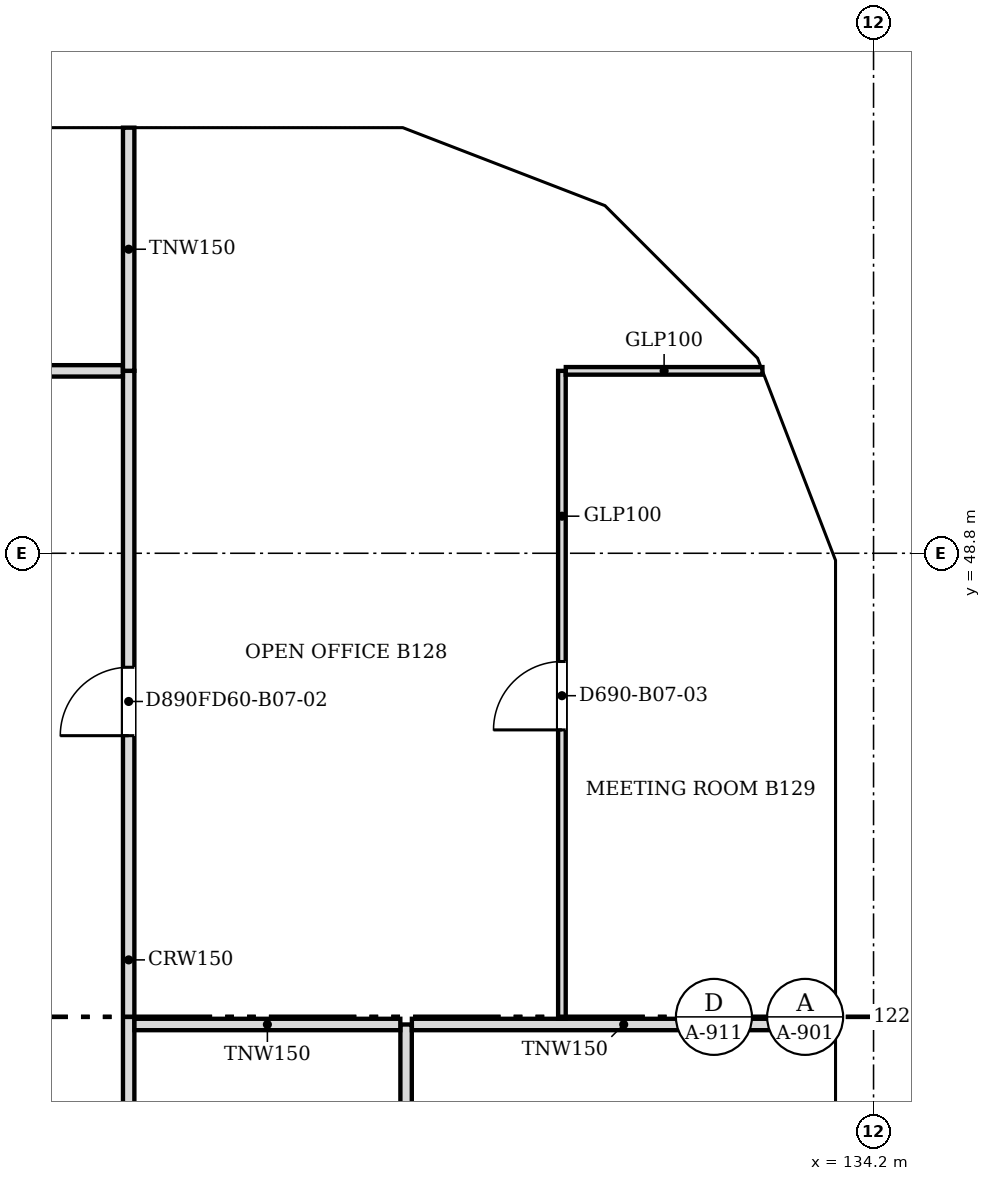
"""IFC4 building model, lengths in metres.
Left out: names, types, materials, properties, quantities, classifications, styles, units other than length and angle.
Written with IfcOpenShell. Run it as: python <this file> out.ifc"""

import sys

from ifc_helpers import new_model, si_unit, direction, frame, frame_2d, origin, place, context, subcontext, project, spatial, polyline, rectangle, outline, extrude, faceted_brep, source, transform, mapped, element, fill, save


model = new_model("IFC4")
c1 = context("Model", 3, precision=1e-05, world=origin(), true_north=direction((0.0, 1.0)))
c2 = subcontext(c1, "Body", "Model", "MODEL_VIEW")
j1 = project(units=[si_unit("LENGTHUNIT", "METRE"), si_unit("PLANEANGLEUNIT", "RADIAN")], contexts=[c1])
p1 = place(None, origin())
s1 = spatial("IfcSite", under=j1, at=p1, CompositionType="ELEMENT")
p2 = place(p1, origin())
s2 = spatial("IfcBuilding", under=s1, at=p2, CompositionType="ELEMENT")
p3 = place(p2, frame((0.0, 0.0, 68.6)))
s3 = spatial("IfcBuildingStorey", under=s2, at=p3, CompositionType="ELEMENT", Elevation=68.6)
m1 = source(origin(), c2, "Body", "Brep", [
    faceted_brep([(6.1, -0.25, 0.0), (3.05, -0.25, 3.8), (0.0, -0.25, 0.0), (6.1, -0.25, 0.0), (0.0, 0.25, 0.0), (3.05, 0.25, 3.8), (6.1, 0.25, 0.0), (6.1, 0.25, 0.0)], [[[0, 1, 2, 3]], [[4, 5, 6, 7]], [[6, 5, 1, 0]], [[5, 4, 2, 1]], [[4, 7, 3, 2]], [[3, 7, 6, 0]]]),
])
p4 = place(p3, frame((133.95, 36.6, 0.0), z_axis=(0.0, 0.0, 1.0), x_axis=(0.0, 1.0, 0.0)))
e1 = element("IfcWall", 1, at=p4, inside=s3, PredefinedType="SOLIDWALL", context=c2, shape_type="MappedRepresentation", body=[
    mapped(m1, transform((0.0, 0.0, 0.0), scale=1.0)),
])
m2 = source(origin(), c2, "Body", "SweptSolid", [
    extrude(outline(polyline([(5.579, 0.25), (3.05, 3.4), (0.521, 0.25), (5.579, 0.25)])), frame((0.0, 0.26, 0.0), z_axis=(0.0, -1.0, 0.0), x_axis=(1.0, 0.0, 0.0)), (0.0, 0.0, 1.0), 0.52),
])
p5 = place(p4, origin())
e2 = element("IfcOpeningElement", 2, at=p5, cuts=e1, PredefinedType="OPENING", context=c2, shape_type="MappedRepresentation", body=[
    mapped(m2, transform((0.0, 0.0, 0.0), scale=1.0)),
])
m3 = source(origin(), c2, "Body", "Brep", [
    faceted_brep([(6.053, -0.25, 0.0), (3.05, -0.25, 3.8), (0.0, -0.25, 0.0), (0.0, 0.25, 0.0), (3.05, 0.25, 3.8), (6.007, 0.25, 0.059), (6.007, 0.25, 0.0), (6.053, 0.0, 0.0)], [[[0, 1, 2]], [[3, 4, 5, 6]], [[5, 4, 1, 0, 7]], [[4, 3, 2, 1]], [[3, 6, 7, 0, 2]], [[7, 6, 5]]]),
])
p6 = place(p3, frame((133.95, 42.7, 0.0), z_axis=(0.0, 0.0, 1.0), x_axis=(0.0, 1.0, 0.0)))
e3 = element("IfcWall", 3, at=p6, inside=s3, PredefinedType="SOLIDWALL", context=c2, shape_type="MappedRepresentation", body=[
    mapped(m3, transform((0.0, 0.0, 0.0), scale=1.0)),
])
m4 = source(origin(), c2, "Body", "SweptSolid", [
    extrude(outline(polyline([(5.537, 0.25), (3.049, 3.399), (0.521, 0.25), (5.537, 0.25)])), frame((0.0, 0.26, 0.0), z_axis=(0.0, -1.0, 0.0), x_axis=(1.0, 0.0, 0.0)), (0.0, 0.0, 1.0), 0.52),
])
p7 = place(p6, origin())
e4 = element("IfcOpeningElement", 4, at=p7, cuts=e3, PredefinedType="OPENING", context=c2, shape_type="MappedRepresentation", body=[
    mapped(m4, transform((0.0, 0.0, 0.0), scale=1.0)),
])
m5 = source(origin(), c2, "Body", "Brep", [
    faceted_brep([(3.003, -0.25, 3.731), (2.95, -0.25, 3.8), (0.0, -0.25, 0.0), (3.003, -0.25, 0.0), (0.047, 0.25, 0.06), (2.898, 0.25, 3.732), (2.898, 0.25, 0.0), (0.047, 0.25, 0.0), (2.95, 0.0, 3.8), (0.0, 0.0, 0.0)], [[[0, 1, 2, 3]], [[4, 5, 6, 7]], [[8, 1, 0]], [[5, 4, 9, 2, 1, 8]], [[7, 6, 3, 2, 9]], [[7, 9, 4]], [[3, 6, 5, 8, 0]]]),
])
p8 = place(p3, frame((133.95, 48.753, 0.0), z_axis=(0.0, 0.0, 1.0), x_axis=(-0.359855894603, 0.933007896601, 0.0)))
e5 = element("IfcWall", 5, at=p8, inside=s3, PredefinedType="SOLIDWALL", context=c2, shape_type="MappedRepresentation", body=[
    mapped(m5, transform((0.0, 0.0, 0.0), scale=1.0)),
])
m6 = source(origin(), c2, "Body", "SweptSolid", [
    extrude(outline(polyline([(2.75, 3.135), (0.511, 0.25), (2.75, 0.25), (2.75, 3.135)])), frame((0.0, 0.26, 0.0), z_axis=(0.0, -1.0, 0.0), x_axis=(1.0, 0.0, 0.0)), (0.0, 0.0, 1.0), 0.52),
])
p9 = place(p8, origin())
e6 = element("IfcOpeningElement", 6, at=p9, cuts=e5, PredefinedType="OPENING", context=c2, shape_type="MappedRepresentation", body=[
    mapped(m6, transform((0.0, 0.0, 0.0), scale=1.0)),
])
m7 = source(origin(), c2, "Body", "Brep", [
    faceted_brep([(2.997, -0.25, 0.0), (0.053, -0.25, 3.8), (0.0, -0.25, 3.732), (0.0, -0.25, 0.0), (0.106, 0.25, 3.731), (2.944, 0.25, 0.068), (2.944, 0.25, 0.0), (0.106, 0.25, 0.0), (0.053, 0.0, 3.8), (2.997, 0.0, 0.0)], [[[0, 1, 2, 3]], [[4, 5, 6, 7]], [[5, 4, 8, 1, 0, 9]], [[2, 1, 8]], [[7, 6, 9, 0, 3]], [[7, 3, 2, 8, 4]], [[9, 6, 5]]]),
])
p10 = place(p3, frame((132.926, 51.469, 0.0), z_axis=(0.0, 0.0, 1.0), x_axis=(-0.707066050402, 0.707147509625, 0.0)))
e7 = element("IfcWall", 7, at=p10, inside=s3, PredefinedType="SOLIDWALL", context=c2, shape_type="MappedRepresentation", body=[
    mapped(m7, transform((0.0, 0.0, 0.0), scale=1.0)),
])
m8 = source(origin(), c2, "Body", "SweptSolid", [
    extrude(outline(polyline([(2.487, 0.25), (0.253, 3.134), (0.253, 0.25), (2.487, 0.25)])), frame((0.0, 0.26, 0.0), z_axis=(0.0, -1.0, 0.0), x_axis=(1.0, 0.0, 0.0)), (0.0, 0.0, 1.0), 0.52),
])
p11 = place(p10, origin())
e8 = element("IfcOpeningElement", 8, at=p11, cuts=e7, PredefinedType="OPENING", context=c2, shape_type="MappedRepresentation", body=[
    mapped(m8, transform((0.0, 0.0, 0.0), scale=1.0)),
])
m9 = source(origin(), c2, "Body", "Brep", [
    faceted_brep([(2.997, -0.25, 3.741), (2.95, -0.25, 3.8), (0.0, -0.25, 0.0), (2.997, -0.25, 0.0), (0.053, 0.25, 0.068), (2.904, 0.25, 3.74), (2.904, 0.25, 0.0), (0.053, 0.25, 0.0), (2.95, 0.0, 3.8), (0.0, 0.0, 0.0)], [[[0, 1, 2, 3]], [[4, 5, 6, 7]], [[8, 1, 0]], [[5, 4, 9, 2, 1, 8]], [[7, 6, 3, 2, 9]], [[7, 9, 4]], [[3, 6, 5, 8, 0]]]),
])
p12 = place(p3, frame((130.806, 53.588, 0.0), z_axis=(0.0, 0.0, 1.0), x_axis=(-0.932990326376, 0.359901446078, 0.0)))
e9 = element("IfcWall", 9, at=p12, inside=s3, PredefinedType="SOLIDWALL", context=c2, shape_type="MappedRepresentation", body=[
    mapped(m9, transform((0.0, 0.0, 0.0), scale=1.0)),
])
p13 = place(p12, origin())
e10 = element("IfcOpeningElement", 10, at=p13, cuts=e9, PredefinedType="OPENING", context=c2, shape_type="MappedRepresentation", body=[
    mapped(m6, transform((0.0, 0.0, 0.0), scale=1.0)),
])
m10 = source(origin(), c2, "Body", "Brep", [
    faceted_brep([(3.05, -0.25, 0.0), (0.047, -0.25, 3.8), (0.0, -0.25, 3.74), (0.0, -0.25, 0.0), (0.093, 0.25, 3.741), (3.05, 0.25, 0.0), (0.093, 0.25, 0.0), (0.047, 0.0, 3.8)], [[[0, 1, 2, 3]], [[4, 5, 6]], [[5, 4, 7, 1, 0]], [[2, 1, 7]], [[6, 5, 0, 3]], [[6, 3, 2, 7, 4]]]),
])
p14 = place(p3, frame((128.1, 54.65, 0.0), z_axis=(0.0, 0.0, 1.0), x_axis=(-1.0, 0.0, 0.0)))
e11 = element("IfcWall", 11, at=p14, inside=s3, PredefinedType="SOLIDWALL", context=c2, shape_type="MappedRepresentation", body=[
    mapped(m10, transform((0.0, 0.0, 0.0), scale=1.0)),
])
m11 = source(origin(), c2, "Body", "SweptSolid", [
    extrude(outline(polyline([(2.534, 0.25), (0.247, 3.144), (0.247, 0.25), (2.534, 0.25)])), frame((0.0, 0.26, 0.0), z_axis=(0.0, -1.0, 0.0), x_axis=(1.0, 0.0, 0.0)), (0.0, 0.0, 1.0), 0.52),
])
p15 = place(p14, origin())
e12 = element("IfcOpeningElement", 12, at=p15, cuts=e11, PredefinedType="OPENING", context=c2, shape_type="MappedRepresentation", body=[
    mapped(m11, transform((0.0, 0.0, 0.0), scale=1.0)),
])
m12 = source(origin(), c2, "Body", "SweptSolid", [
    extrude(outline(polyline([(6.1, 0.0), (3.05, 3.8), (0.0, 0.0), (6.1, 0.0)])), frame((0.0, 0.25, 0.0), z_axis=(0.0, -1.0, 0.0), x_axis=(1.0, 0.0, 0.0)), (0.0, 0.0, 1.0), 0.5),
])
p16 = place(p3, frame((125.05, 54.65, 0.0), z_axis=(0.0, 0.0, 1.0), x_axis=(-1.0, 0.0, 0.0)))
e13 = element("IfcWall", 13, at=p16, inside=s3, PredefinedType="SOLIDWALL", context=c2, shape_type="MappedRepresentation", body=[
    mapped(m12, transform((0.0, 0.0, 0.0), scale=1.0)),
])
p17 = place(p16, origin())
e14 = element("IfcOpeningElement", 14, at=p17, cuts=e13, PredefinedType="OPENING", context=c2, shape_type="MappedRepresentation", body=[
    mapped(m2, transform((0.0, 0.0, 0.0), scale=1.0)),
])
p18 = place(p2, frame((0.0, 0.0, 72.4)))
s4 = spatial("IfcBuildingStorey", under=s2, at=p18, CompositionType="ELEMENT", Elevation=72.4)
m13 = source(origin(), c2, "Body", "SweptSolid", [
    extrude(outline(polyline([(3.05, 0.0), (6.1, 3.8), (3.05, 7.6), (0.0, 3.8), (3.05, 0.0)])), frame((0.0, 0.25, 0.0), z_axis=(0.0, -1.0, 0.0), x_axis=(1.0, 0.0, 0.0)), (0.0, 0.0, 1.0), 0.5),
])
p19 = place(p18, frame((133.95, 39.65, -3.8), z_axis=(0.0, 0.0, 1.0), x_axis=(0.0, 1.0, 0.0)))
e15 = element("IfcWall", 15, at=p19, inside=s4, PredefinedType="SOLIDWALL", context=c2, shape_type="MappedRepresentation", body=[
    mapped(m13, transform((0.0, 0.0, 0.0), scale=1.0)),
])
m14 = source(origin(), c2, "Body", "SweptSolid", [
    extrude(outline(polyline([(3.05, 0.399), (5.78, 3.8), (3.05, 7.2), (0.321, 3.8), (3.05, 0.399)])), frame((0.0, 0.26, 0.0), z_axis=(0.0, -1.0, 0.0), x_axis=(1.0, 0.0, 0.0)), (0.0, 0.0, 1.0), 0.52),
])
p20 = place(p19, origin())
e16 = element("IfcOpeningElement", 16, at=p20, cuts=e15, PredefinedType="OPENING", context=c2, shape_type="MappedRepresentation", body=[
    mapped(m14, transform((0.0, 0.0, 0.0), scale=1.0)),
])
m15 = source(origin(), c2, "Body", "Brep", [
    faceted_brep([(3.003, -0.25, 0.0), (3.05, -0.25, 0.06), (3.05, -0.25, 7.54), (3.003, -0.25, 7.6), (0.0, -0.25, 3.8), (0.0, 0.25, 3.8), (2.957, 0.25, 7.541), (2.957, 0.25, 0.059), (3.003, 0.0, 0.0), (3.003, 0.0, 7.6)], [[[0, 1, 2, 3, 4]], [[5, 6, 7]], [[1, 0, 8]], [[9, 3, 2]], [[6, 5, 4, 3, 9]], [[5, 7, 8, 0, 4]], [[1, 8, 7, 6, 9, 2]]]),
])
p21 = place(p18, frame((133.95, 45.75, -3.8), z_axis=(0.0, 0.0, 1.0), x_axis=(0.0, 1.0, 0.0)))
e17 = element("IfcWall", 17, at=p21, inside=s4, PredefinedType="SOLIDWALL", context=c2, shape_type="MappedRepresentation", body=[
    mapped(m15, transform((0.0, 0.0, 0.0), scale=1.0)),
])
m16 = source(origin(), c2, "Body", "SweptSolid", [
    extrude(outline(polyline([(2.803, 6.944), (0.319, 3.8), (2.803, 0.656), (2.803, 6.944)])), frame((0.0, 0.26, 0.0), z_axis=(0.0, -1.0, 0.0), x_axis=(1.0, 0.0, 0.0)), (0.0, 0.0, 1.0), 0.52),
])
p22 = place(p21, origin())
e18 = element("IfcOpeningElement", 18, at=p22, cuts=e17, PredefinedType="OPENING", context=c2, shape_type="MappedRepresentation", body=[
    mapped(m16, transform((0.0, 0.0, 0.0), scale=1.0)),
])
m17 = source(origin(), c2, "Body", "Brep", [
    faceted_brep([(0.047, -0.25, 0.0), (2.997, -0.25, 3.8), (0.047, -0.25, 7.6), (0.0, -0.25, 7.541), (0.0, -0.25, 0.059), (0.093, 0.25, 7.54), (2.944, 0.25, 3.868), (2.944, 0.25, 3.732), (0.093, 0.25, 0.06), (2.997, 0.0, 3.8), (0.047, 0.0, 0.0), (0.047, 0.0, 7.6)], [[[0, 1, 2, 3, 4]], [[5, 6, 7, 8]], [[8, 7, 9, 1, 0, 10]], [[6, 5, 11, 2, 1, 9]], [[3, 2, 11]], [[10, 0, 4]], [[8, 10, 4, 3, 11, 5]], [[9, 7, 6]]]),
])
p23 = place(p18, frame((133.967, 48.71, -3.8), z_axis=(0.0, 0.0, 1.0), x_axis=(-0.359901446078, 0.932990326376, 0.0)))
e19 = element("IfcWall", 19, at=p23, inside=s4, PredefinedType="SOLIDWALL", context=c2, shape_type="MappedRepresentation", body=[
    mapped(m17, transform((0.0, 0.0, 0.0), scale=1.0)),
])
m18 = source(origin(), c2, "Body", "SweptSolid", [
    extrude(outline(polyline([(0.247, 0.665), (2.681, 3.8), (0.247, 6.935), (0.247, 0.665)])), frame((0.0, 0.26, 0.0), z_axis=(0.0, -1.0, 0.0), x_axis=(1.0, 0.0, 0.0)), (0.0, 0.0, 1.0), 0.52),
])
p24 = place(p23, origin())
e20 = element("IfcOpeningElement", 20, at=p24, cuts=e19, PredefinedType="OPENING", context=c2, shape_type="MappedRepresentation", body=[
    mapped(m18, transform((0.0, 0.0, 0.0), scale=1.0)),
])
m19 = source(origin(), c2, "Body", "Brep", [
    faceted_brep([(2.944, -0.25, 0.0), (2.997, -0.25, 0.068), (2.997, -0.25, 7.532), (2.944, -0.25, 7.6), (0.0, -0.25, 3.8), (0.053, 0.25, 3.868), (2.891, 0.25, 7.532), (2.891, 0.25, 0.068), (0.053, 0.25, 3.731), (2.944, 0.0, 0.0), (2.944, 0.0, 7.6), (0.0, 0.0, 3.8)], [[[0, 1, 2, 3, 4]], [[5, 6, 7, 8]], [[1, 0, 9]], [[10, 3, 2]], [[6, 5, 11, 4, 3, 10]], [[8, 7, 9, 0, 4, 11]], [[8, 11, 5]], [[1, 9, 7, 6, 10, 2]]]),
])
p25 = place(p18, frame((132.888, 51.506, -3.8), z_axis=(0.0, 0.0, 1.0), x_axis=(-0.707147509625, 0.707066050402, 0.0)))
e21 = element("IfcWall", 21, at=p25, inside=s4, PredefinedType="SOLIDWALL", context=c2, shape_type="MappedRepresentation", body=[
    mapped(m19, transform((0.0, 0.0, 0.0), scale=1.0)),
])
m20 = source(origin(), c2, "Body", "SweptSolid", [
    extrude(outline(polyline([(2.744, 6.934), (0.316, 3.8), (2.744, 0.666), (2.744, 6.934)])), frame((0.0, 0.26, 0.0), z_axis=(0.0, -1.0, 0.0), x_axis=(1.0, 0.0, 0.0)), (0.0, 0.0, 1.0), 0.52),
])
p26 = place(p25, origin())
e22 = element("IfcOpeningElement", 22, at=p26, cuts=e21, PredefinedType="OPENING", context=c2, shape_type="MappedRepresentation", body=[
    mapped(m20, transform((0.0, 0.0, 0.0), scale=1.0)),
])
m21 = source(origin(), c2, "Body", "Brep", [
    faceted_brep([(0.053, -0.25, 0.0), (3.003, -0.25, 3.8), (0.053, -0.25, 7.6), (0.0, -0.25, 7.531), (0.0, -0.25, 0.068), (0.106, 0.25, 7.532), (2.957, 0.25, 3.86), (2.957, 0.25, 3.74), (0.106, 0.25, 0.068), (3.003, 0.0, 3.8), (0.053, 0.0, 0.0), (0.053, 0.0, 7.6)], [[[0, 1, 2, 3, 4]], [[5, 6, 7, 8]], [[8, 7, 9, 1, 0, 10]], [[6, 5, 11, 2, 1, 9]], [[3, 2, 11]], [[10, 0, 4]], [[8, 10, 4, 3, 11, 5]], [[9, 7, 6]]]),
])
p27 = place(p18, frame((130.856, 53.569, -3.8), z_axis=(0.0, 0.0, 1.0), x_axis=(-0.933007896601, 0.359855894603, 0.0)))
e23 = element("IfcWall", 23, at=p27, inside=s4, PredefinedType="SOLIDWALL", context=c2, shape_type="MappedRepresentation", body=[
    mapped(m21, transform((0.0, 0.0, 0.0), scale=1.0)),
])
m22 = source(origin(), c2, "Body", "SweptSolid", [
    extrude(outline(polyline([(0.253, 0.665), (2.687, 3.8), (0.253, 6.935), (0.253, 0.665)])), frame((0.0, 0.26, 0.0), z_axis=(0.0, -1.0, 0.0), x_axis=(1.0, 0.0, 0.0)), (0.0, 0.0, 1.0), 0.52),
])
p28 = place(p27, origin())
e24 = element("IfcOpeningElement", 24, at=p28, cuts=e23, PredefinedType="OPENING", context=c2, shape_type="MappedRepresentation", body=[
    mapped(m22, transform((0.0, 0.0, 0.0), scale=1.0)),
])
m23 = source(origin(), c2, "Body", "Brep", [
    faceted_brep([(3.003, -0.25, 0.0), (6.053, -0.25, 3.8), (3.003, -0.25, 7.6), (0.0, -0.25, 3.8), (0.047, 0.25, 3.859), (3.003, 0.25, 7.6), (6.053, 0.25, 3.8), (3.003, 0.25, 0.0), (0.047, 0.25, 3.741), (0.0, 0.0, 3.8)], [[[0, 1, 2, 3]], [[4, 5, 6, 7, 8]], [[7, 6, 1, 0]], [[6, 5, 2, 1]], [[5, 4, 9, 3, 2]], [[8, 7, 0, 3, 9]], [[8, 9, 4]]]),
])
p29 = place(p18, frame((128.053, 54.65, -3.8), z_axis=(0.0, 0.0, 1.0), x_axis=(-1.0, 0.0, 0.0)))
e25 = element("IfcWall", 25, at=p29, inside=s4, PredefinedType="SOLIDWALL", context=c2, shape_type="MappedRepresentation", body=[
    mapped(m23, transform((0.0, 0.0, 0.0), scale=1.0)),
])
m24 = source(origin(), c2, "Body", "SweptSolid", [
    extrude(outline(polyline([(3.005, 0.401), (5.733, 3.8), (3.005, 7.199), (0.319, 3.8), (3.005, 0.401)])), frame((0.0, 0.26, 0.0), z_axis=(0.0, -1.0, 0.0), x_axis=(1.0, 0.0, 0.0)), (0.0, 0.0, 1.0), 0.52),
])
p30 = place(p29, origin())
e26 = element("IfcOpeningElement", 26, at=p30, cuts=e25, PredefinedType="OPENING", context=c2, shape_type="MappedRepresentation", body=[
    mapped(m24, transform((0.0, 0.0, 0.0), scale=1.0)),
])
p31 = place(p3, frame((124.4, 51.2, 0.0), z_axis=(0.0, 0.0, 1.0), x_axis=(0.0, -1.0, 0.0)))
e27 = element("IfcWall", 27, at=p31, inside=s3, PredefinedType="PARTITIONING", context=c2, shape_type="SweptSolid", body=[
    extrude(rectangle(XDim=14.6, YDim=0.15, at=frame_2d((7.3, 0.0))), origin(), (0.0, 0.0, 1.0), 3.067),
])
m25 = source(origin(), c2, "Body", "SweptSolid", [
    extrude(rectangle(XDim=0.9, YDim=2.1, at=frame_2d((0.45, 1.05))), frame((0.0, 0.085, 0.0), z_axis=(0.0, -1.0, 0.0), x_axis=(1.0, 0.0, 0.0)), (0.0, 0.0, 1.0), 0.17),
])
p32 = place(p31, frame((3.9, 0.0, 0.0)))
e28 = element("IfcOpeningElement", 28, at=p32, cuts=e27, PredefinedType="OPENING", context=c2, shape_type="MappedRepresentation", body=[
    mapped(m25, transform((0.0, 0.0, 0.0), scale=1.0)),
])
m26 = source(origin(), c2, "Body", "SweptSolid", [
    extrude(rectangle(XDim=1.8, YDim=2.1, at=frame_2d((0.9, 1.05))), frame((0.0, 0.085, 0.0), z_axis=(0.0, -1.0, 0.0), x_axis=(1.0, 0.0, 0.0)), (0.0, 0.0, 1.0), 0.17),
])
p33 = place(p31, frame((10.7, 0.0, 0.0)))
e29 = element("IfcOpeningElement", 29, at=p33, cuts=e27, PredefinedType="OPENING", context=c2, shape_type="MappedRepresentation", body=[
    mapped(m26, transform((0.0, 0.0, 0.0), scale=1.0)),
])
p34 = place(p3, frame((128.05, 42.6, 0.0), z_axis=(0.0, 0.0, 1.0), x_axis=(0.0, -1.0, 0.0)))
e30 = element("IfcWall", 30, at=p34, inside=s3, PredefinedType="PARTITIONING", context=c2, shape_type="SweptSolid", body=[
    extrude(rectangle(XDim=5.924, YDim=0.15, at=frame_2d((2.962, 0.0))), origin(), (0.0, 0.0, 1.0), 3.067),
])
p35 = place(p34, frame((2.024, 0.0, 0.0)))
e31 = element("IfcOpeningElement", 31, at=p35, cuts=e30, PredefinedType="OPENING", context=c2, shape_type="MappedRepresentation", body=[
    mapped(m26, transform((0.0, 0.0, 0.0), scale=1.0)),
])
p36 = place(p3, frame((124.476, 42.6, 0.0), z_axis=(0.0, 0.0, 1.0), x_axis=(1.0, 0.0, 0.0)))
e32 = element("IfcWall", 32, at=p36, inside=s3, PredefinedType="PARTITIONING", context=c2, shape_type="SweptSolid", body=[
    extrude(rectangle(XDim=3.498, YDim=0.15, at=frame_2d((1.749, 0.0))), origin(), (0.0, 0.0, 1.0), 3.067),
])
p37 = place(p3, frame((128.126, 42.6, 0.0), z_axis=(0.0, 0.0, 1.0), x_axis=(1.0, 0.0, 0.0)))
e33 = element("IfcWall", 33, at=p37, inside=s3, PredefinedType="PARTITIONING", context=c2, shape_type="SweptSolid", body=[
    extrude(rectangle(XDim=5.574, YDim=0.15, at=frame_2d((2.787, 0.0))), origin(), (0.0, 0.0, 1.0), 3.067),
])
p38 = place(p3, frame((130.1, 51.2, 0.0), z_axis=(0.0, 0.0, 1.0), x_axis=(0.0, -1.0, 0.0)))
e34 = element("IfcWall", 34, at=p38, inside=s3, PredefinedType="PARTITIONING", context=c2, shape_type="SweptSolid", body=[
    extrude(rectangle(XDim=8.524, YDim=0.1, at=frame_2d((4.262, 0.0))), origin(), (0.0, 0.0, 1.0), 3.067),
])
m27 = source(origin(), c2, "Body", "SweptSolid", [
    extrude(rectangle(XDim=0.9, YDim=2.1, at=frame_2d((0.45, 1.05))), frame((0.0, 0.06, 0.0), z_axis=(0.0, -1.0, 0.0), x_axis=(1.0, 0.0, 0.0)), (0.0, 0.0, 1.0), 0.12),
])
p39 = place(p38, frame((3.824, 0.0, 0.0)))
e35 = element("IfcOpeningElement", 35, at=p39, cuts=e34, PredefinedType="OPENING", context=c2, shape_type="MappedRepresentation", body=[
    mapped(m27, transform((0.0, 0.0, 0.0), scale=1.0)),
])
p40 = place(p3, frame((108.5, 51.2, 0.0), z_axis=(0.0, 0.0, 1.0), x_axis=(1.0, 0.0, 0.0)))
e36 = element("IfcWall", 36, at=p40, inside=s3, PredefinedType="PARTITIONING", context=c2, shape_type="SweptSolid", body=[
    extrude(rectangle(XDim=15.824, YDim=0.15, at=frame_2d((7.912, 0.0))), origin(), (0.0, 0.0, 1.0), 3.067),
])
m28 = source(origin(), c2, "Body", "SweptSolid", [
    extrude(rectangle(XDim=1.0, YDim=2.1, at=frame_2d((0.5, 1.05))), frame((0.0, 0.085, 0.0), z_axis=(0.0, -1.0, 0.0), x_axis=(1.0, 0.0, 0.0)), (0.0, 0.0, 1.0), 0.17),
])
p41 = place(p40, frame((11.451, 0.0, 0.0)))
e37 = element("IfcOpeningElement", 37, at=p41, cuts=e36, PredefinedType="OPENING", context=c2, shape_type="MappedRepresentation", body=[
    mapped(m28, transform((0.0, 0.0, 0.0), scale=1.0)),
])
p42 = place(p40, frame((3.5, 0.0, 0.0)))
e38 = element("IfcOpeningElement", 38, at=p42, cuts=e36, PredefinedType="OPENING", context=c2, shape_type="MappedRepresentation", body=[
    mapped(m28, transform((0.0, 0.0, 0.0), scale=1.0)),
])
p43 = place(p3, frame((124.4, 51.201, 0.0), z_axis=(0.0, 0.0, 1.0), x_axis=(0.0, 1.0, 0.0)))
e39 = element("IfcWall", 39, at=p43, inside=s3, PredefinedType="PARTITIONING", context=c2, shape_type="SweptSolid", body=[
    extrude(rectangle(XDim=3.199, YDim=0.15, at=frame_2d((1.6, 0.0))), origin(), (0.0, 0.0, 1.0), 3.067),
])
p44 = place(p3, frame((130.151, 51.2, 0.0), z_axis=(0.0, 0.0, 1.0), x_axis=(1.0, 0.0, 0.0)))
e40 = element("IfcWall", 40, at=p44, inside=s3, PredefinedType="PARTITIONING", context=c2, shape_type="SweptSolid", body=[
    extrude(rectangle(XDim=2.587, YDim=0.1, at=frame_2d((1.294, 0.0))), origin(), (0.0, 0.0, 1.0), 3.067),
])
m29 = source(origin(), c2, "Body", "SweptSolid", [
    extrude(rectangle(XDim=0.9, YDim=2.1, at=frame_2d((0.45, 1.05))), frame((0.0, 0.025, 0.0), z_axis=(0.0, -1.0, 0.0), x_axis=(1.0, 0.0, 0.0)), (0.0, 0.0, 1.0), 0.05),
])
p45 = place(p32, origin())
e41 = element("IfcDoor", 41, at=p45, inside=s3, OperationType="SINGLE_SWING_RIGHT", PredefinedType="DOOR", context=c2, shape_type="MappedRepresentation", body=[
    mapped(m29, transform((0.0, 0.0, 0.0), scale=1.0)),
])
fill(e28, e41)
p46 = place(p39, origin())
e42 = element("IfcDoor", 42, at=p46, inside=s3, OperationType="SINGLE_SWING_RIGHT", PredefinedType="DOOR", context=c2, shape_type="MappedRepresentation", body=[
    mapped(m29, transform((0.0, 0.0, 0.0), scale=1.0)),
])
fill(e35, e42)
save(model, sys.argv[1])
